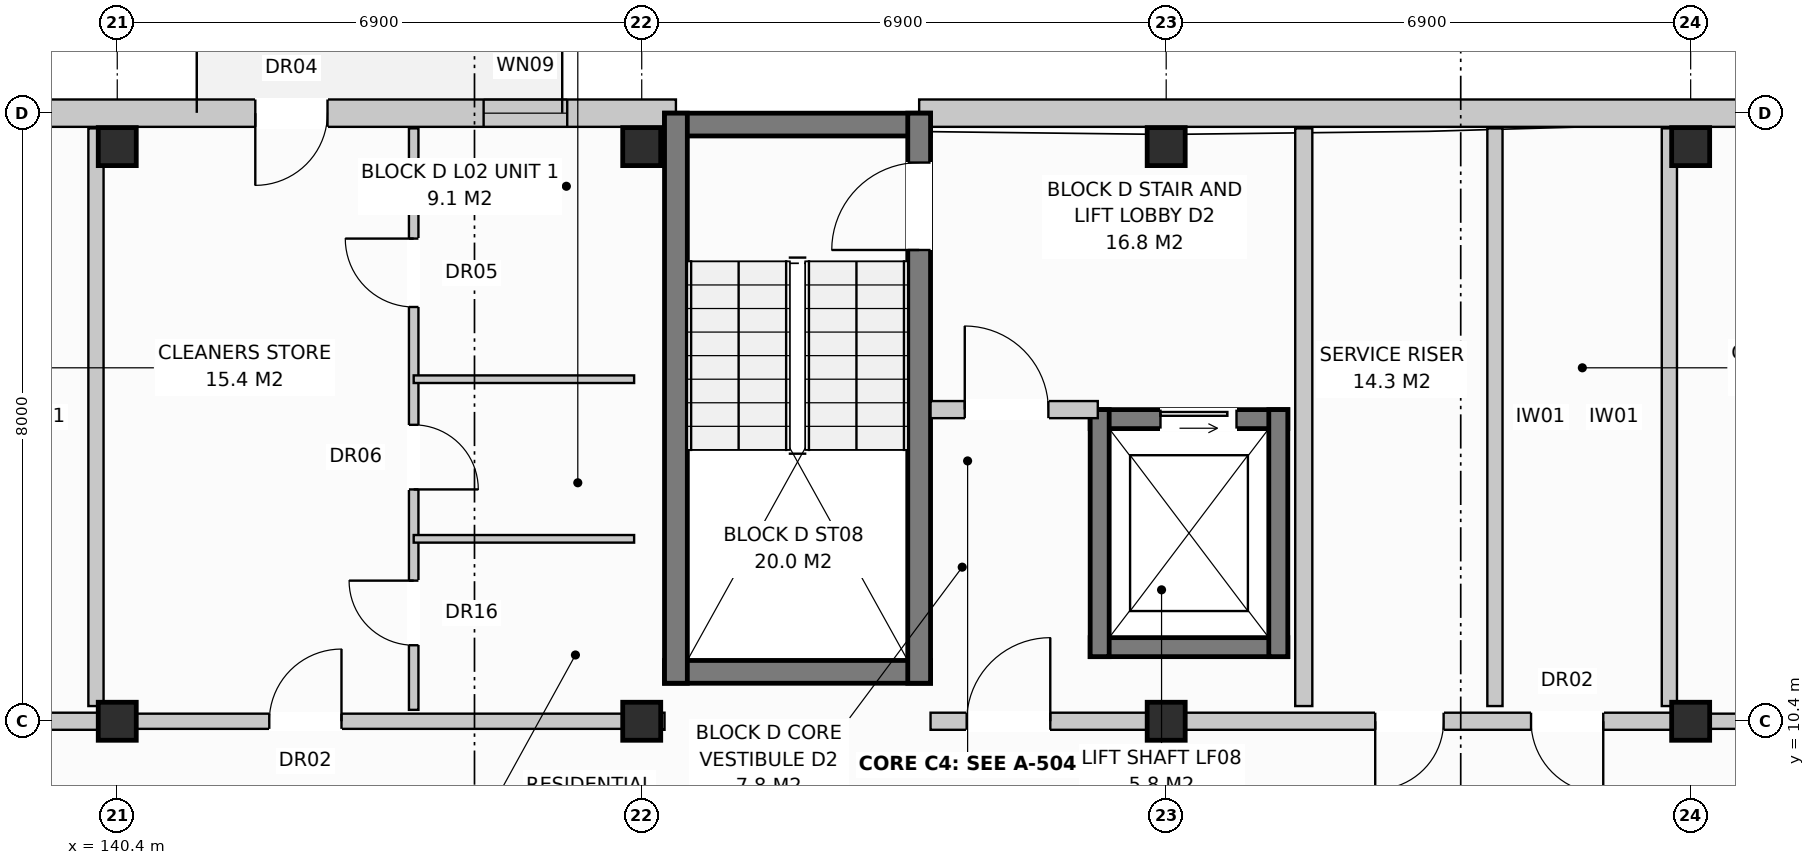
"""IFC4 building model, lengths in metres.
Left out: names, types, materials, properties, quantities, classifications, styles, units other than length and angle.
Written with IfcOpenShell. Run it as: python <this file> out.ifc"""

import sys

from ifc_helpers import new_model, si_unit, direction, frame, frame_2d, origin, origin_with_axes, origin_2d, place, context, subcontext, project, spatial, rectangle, extrude, element, fill, save


model = new_model("IFC4")
c1 = context("Model", 3, precision=1e-05, world=origin(), true_north=direction((0.0, 1.0)))
c2 = subcontext(c1, "Body", "Model", "MODEL_VIEW")
j1 = project(units=[si_unit("LENGTHUNIT", "METRE"), si_unit("PLANEANGLEUNIT", "RADIAN")], contexts=[c1])
p1 = place(None, origin())
s1 = spatial("IfcSite", under=j1, at=p1, CompositionType="ELEMENT")
p2 = place(p1, origin())
s2 = spatial("IfcBuilding", under=s1, at=p2, CompositionType="ELEMENT")
p3 = place(p2, frame((0.0, 0.0, 8.0)))
s3 = spatial("IfcBuildingStorey", under=s2, at=p3, CompositionType="ELEMENT", Elevation=8.0)
for number, where, z_axis, x_axis in (
    (1, (140.4, 10.4, 0.0), (0.0, 0.0, 1.0), (1.0, 0.0, 0.0)),
    (2, (140.4, 17.96, 0.0), (0.0, 0.0, 1.0), (1.0, 0.0, 0.0)),
    (3, (147.3, 10.4, 0.0), (0.0, 0.0, 1.0), (1.0, 0.0, 0.0)),
    (4, (147.3, 17.96, 0.0), (0.0, 0.0, 1.0), (1.0, 0.0, 0.0)),
    (5, (154.2, 10.4, 0.0), (0.0, 0.0, 1.0), (1.0, 0.0, 0.0)),
    (6, (154.2, 17.96, 0.0), (0.0, 0.0, 1.0), (1.0, 0.0, 0.0)),
    (7, (161.1, 10.4, 0.0), (0.0, 0.0, 1.0), (1.0, 0.0, 0.0)),
    (8, (161.1, 17.96, 0.0), (0.0, 0.0, 1.0), (1.0, 0.0, 0.0)),
):
    element("IfcColumn", number, at=place(p3, frame(where, z_axis=z_axis, x_axis=x_axis)), inside=s3, PredefinedType="COLUMN", context=c2, shape_type="SweptSolid", body=[
        extrude(rectangle(XDim=0.5, YDim=0.5, at=origin_2d()), origin(), (0.0, 0.0, 1.0), 3.2),
    ])
p4 = place(p3, frame((130.25, 18.4, 0.0), z_axis=(0.0, 0.0, 1.0), x_axis=(1.0, 0.0, 0.0)))
e9 = element("IfcWall", 9, at=p4, inside=s3, PredefinedType="STANDARD", context=c2, shape_type="SweptSolid", body=[
    extrude(rectangle(XDim=17.5, YDim=0.36, at=frame_2d((8.75, 0.0))), origin(), (0.0, 0.0, 1.0), 2.94),
])
p5 = place(p4, frame((11.966, 0.0, 0.0)))
e10 = element("IfcOpeningElement", 10, at=p5, cuts=e9, PredefinedType="OPENING", context=c2, shape_type="SweptSolid", body=[
    extrude(rectangle(XDim=0.95, YDim=2.1, at=frame_2d((0.475, 1.05))), frame((0.0, 0.192, 0.0), z_axis=(0.0, -1.0, 0.0), x_axis=(1.0, 0.0, 0.0)), (0.0, 0.0, 1.0), 0.384),
])
p6 = place(p4, frame((14.97, 0.0, 0.72)))
e11 = element("IfcOpeningElement", 11, at=p6, cuts=e9, PredefinedType="OPENING", context=c2, shape_type="SweptSolid", body=[
    extrude(rectangle(XDim=1.1, YDim=1.5, at=frame_2d((0.55, 0.75))), frame((0.0, 0.192, 0.0), z_axis=(0.0, -1.0, 0.0), x_axis=(1.0, 0.0, 0.0)), (0.0, 0.0, 1.0), 0.384),
])
p7 = place(p3, frame((150.95, 18.4, 0.0), z_axis=(0.0, 0.0, 1.0), x_axis=(1.0, 0.0, 0.0)))
e12 = element("IfcWall", 12, at=p7, inside=s3, PredefinedType="STANDARD", context=c2, shape_type="SweptSolid", body=[
    extrude(rectangle(XDim=16.88, YDim=0.36, at=frame_2d((8.44, 0.0))), origin(), (0.0, 0.0, 1.0), 2.94),
])
p8 = place(p7, frame((11.17, 0.0, 0.8)))
e13 = element("IfcOpeningElement", 13, at=p8, cuts=e12, PredefinedType="OPENING", context=c2, shape_type="SweptSolid", body=[
    extrude(rectangle(XDim=1.9, YDim=1.85, at=frame_2d((0.95, 0.925))), frame((0.0, 0.192, 0.0), z_axis=(0.0, -1.0, 0.0), x_axis=(1.0, 0.0, 0.0)), (0.0, 0.0, 1.0), 0.384),
])
p9 = place(p7, frame((14.97, 0.0, 0.72)))
e14 = element("IfcOpeningElement", 14, at=p9, cuts=e12, PredefinedType="OPENING", context=c2, shape_type="SweptSolid", body=[
    extrude(rectangle(XDim=1.1, YDim=1.5, at=frame_2d((0.55, 0.75))), frame((0.0, 0.192, 0.0), z_axis=(0.0, -1.0, 0.0), x_axis=(1.0, 0.0, 0.0)), (0.0, 0.0, 1.0), 0.384),
])
p10 = place(p3, frame((140.12, 10.6, 0.0), z_axis=(0.0, 0.0, 1.0), x_axis=(0.0, 1.0, 0.0)))
e15 = element("IfcWall", 15, at=p10, inside=s3, PredefinedType="PARTITIONING", context=c2, shape_type="SweptSolid", body=[
    extrude(rectangle(XDim=7.6, YDim=0.2, at=frame_2d((3.8, 0.0))), origin(), (0.0, 0.0, 1.0), 2.94),
])
p11 = place(p3, frame((130.4, 10.4, 0.0), z_axis=(0.0, 0.0, 1.0), x_axis=(1.0, 0.0, 0.0)))
e16 = element("IfcWall", 16, at=p11, inside=s3, PredefinedType="PARTITIONING", context=c2, shape_type="SweptSolid", body=[
    extrude(rectangle(XDim=10.0, YDim=0.225, at=frame_2d((5.0, 0.0))), origin(), (0.0, 0.0, 1.0), 2.38),
])
p12 = place(p11, frame((0.475, 0.0, 0.0)))
e17 = element("IfcOpeningElement", 17, at=p12, cuts=e16, PredefinedType="OPENING", context=c2, shape_type="SweptSolid", body=[
    extrude(rectangle(XDim=1.1, YDim=2.15, at=frame_2d((0.55, 1.075))), frame((0.0, 0.125, 0.0), z_axis=(0.0, -1.0, 0.0), x_axis=(1.0, 0.0, 0.0)), (0.0, 0.0, 1.0), 0.249),
])
p13 = place(p11, frame((5.85, 0.0, 0.0)))
e18 = element("IfcOpeningElement", 18, at=p13, cuts=e16, PredefinedType="OPENING", context=c2, shape_type="SweptSolid", body=[
    extrude(rectangle(XDim=0.9, YDim=2.1, at=frame_2d((0.45, 1.05))), frame((0.0, 0.125, 0.0), z_axis=(0.0, -1.0, 0.0), x_axis=(1.0, 0.0, 0.0)), (0.0, 0.0, 1.0), 0.249),
])
p14 = place(p11, frame((7.9, 0.0, 0.0)))
e19 = element("IfcOpeningElement", 19, at=p14, cuts=e16, PredefinedType="OPENING", context=c2, shape_type="SweptSolid", body=[
    extrude(rectangle(XDim=0.95, YDim=2.15, at=frame_2d((0.475, 1.075))), frame((0.0, 0.125, 0.0), z_axis=(0.0, -1.0, 0.0), x_axis=(1.0, 0.0, 0.0)), (0.0, 0.0, 1.0), 0.249),
])
for number, where, z_axis, x_axis in (
    (20, (147.6, 18.25, 0.0), (0.0, 0.0, 1.0), (1.0, 0.0, 0.0)),
    (21, (147.6, 11.05, 0.0), (0.0, 0.0, 1.0), (1.0, 0.0, 0.0)),
):
    element("IfcWall", number, at=place(p3, frame(where, z_axis=z_axis, x_axis=x_axis)), inside=s3, PredefinedType="SHEAR", context=c2, shape_type="SweptSolid", body=[
        extrude(rectangle(XDim=3.5, YDim=0.3, at=frame_2d((1.75, 0.0))), origin(), (0.0, 0.0, 1.0), 2.94),
    ])
p15 = place(p3, frame((147.75, 10.9, 0.0), z_axis=(0.0, 0.0, 1.0), x_axis=(0.0, 1.0, 0.0)))
e22 = element("IfcWall", 22, at=p15, inside=s3, PredefinedType="SHEAR", context=c2, shape_type="SweptSolid", body=[
    extrude(rectangle(XDim=7.5, YDim=0.3, at=frame_2d((3.75, 0.0))), origin(), (0.0, 0.0, 1.0), 2.94),
])
p16 = place(p3, frame((150.95, 10.9, 0.0), z_axis=(0.0, 0.0, 1.0), x_axis=(0.0, 1.0, 0.0)))
e23 = element("IfcWall", 23, at=p16, inside=s3, PredefinedType="SHEAR", context=c2, shape_type="SweptSolid", body=[
    extrude(rectangle(XDim=7.5, YDim=0.3, at=frame_2d((3.75, 0.0))), origin(), (0.0, 0.0, 1.0), 2.94),
])
p17 = place(p16, frame((5.7, 0.0, 0.0)))
e24 = element("IfcOpeningElement", 24, at=p17, cuts=e23, PredefinedType="OPENING", context=c2, shape_type="SweptSolid", body=[
    extrude(rectangle(XDim=1.15, YDim=2.15, at=frame_2d((0.575, 1.075))), frame((0.0, 0.162, 0.0), z_axis=(0.0, -1.0, 0.0), x_axis=(1.0, 0.0, 0.0)), (0.0, 0.0, 1.0), 0.324),
])
p18 = place(p3, frame((153.2, 14.375, 0.0), z_axis=(0.0, 0.0, 1.0), x_axis=(1.0, 0.0, 0.0)))
e25 = element("IfcWall", 25, at=p18, inside=s3, PredefinedType="SHEAR", context=c2, shape_type="SweptSolid", body=[
    extrude(rectangle(XDim=2.6, YDim=0.25, at=frame_2d((1.3, 0.0))), origin(), (0.0, 0.0, 1.0), 2.94),
])
p19 = place(p18, frame((0.925, 0.0, 0.0)))
e26 = element("IfcOpeningElement", 26, at=p19, cuts=e25, PredefinedType="OPENING", context=c2, shape_type="SweptSolid", body=[
    extrude(rectangle(XDim=1.0, YDim=2.1, at=frame_2d((0.5, 1.05))), frame((0.0, 0.137, 0.0), z_axis=(0.0, -1.0, 0.0), x_axis=(1.0, 0.0, 0.0)), (0.0, 0.0, 1.0), 0.274),
])
p20 = place(p3, frame((153.2, 11.375, 0.0), z_axis=(0.0, 0.0, 1.0), x_axis=(1.0, 0.0, 0.0)))
e27 = element("IfcWall", 27, at=p20, inside=s3, PredefinedType="SHEAR", context=c2, shape_type="SweptSolid", body=[
    extrude(rectangle(XDim=2.6, YDim=0.25, at=frame_2d((1.3, 0.0))), origin(), (0.0, 0.0, 1.0), 2.94),
])
for number, where, z_axis, x_axis in (
    (28, (153.325, 11.25, 0.0), (0.0, 0.0, 1.0), (0.0, 1.0, 0.0)),
    (29, (155.675, 11.25, 0.0), (0.0, 0.0, 1.0), (0.0, 1.0, 0.0)),
):
    element("IfcWall", number, at=place(p3, frame(where, z_axis=z_axis, x_axis=x_axis)), inside=s3, PredefinedType="SHEAR", context=c2, shape_type="SweptSolid", body=[
        extrude(rectangle(XDim=3.25, YDim=0.25, at=frame_2d((1.625, 0.0))), origin(), (0.0, 0.0, 1.0), 2.94),
    ])
p21 = place(p3, frame((156.01, 10.6, 0.0), z_axis=(0.0, 0.0, 1.0), x_axis=(0.0, 1.0, 0.0)))
e30 = element("IfcWall", 30, at=p21, inside=s3, PredefinedType="PARTITIONING", context=c2, shape_type="SweptSolid", body=[
    extrude(rectangle(XDim=7.6, YDim=0.225, at=frame_2d((3.8, 0.0))), origin(), (0.0, 0.0, 1.0), 2.59),
])
p22 = place(p3, frame((151.1, 14.5, 0.0), z_axis=(0.0, 0.0, 1.0), x_axis=(1.0, 0.0, 0.0)))
e31 = element("IfcWall", 31, at=p22, inside=s3, PredefinedType="PARTITIONING", context=c2, shape_type="SweptSolid", body=[
    extrude(rectangle(XDim=2.2, YDim=0.225, at=frame_2d((1.1, 0.0))), origin(), (0.0, 0.0, 1.0), 2.94),
])
p23 = place(p22, frame((0.45, 0.0, 0.0)))
e32 = element("IfcOpeningElement", 32, at=p23, cuts=e31, PredefinedType="OPENING", context=c2, shape_type="SweptSolid", body=[
    extrude(rectangle(XDim=1.1, YDim=2.15, at=frame_2d((0.55, 1.075))), frame((0.0, 0.125, 0.0), z_axis=(0.0, -1.0, 0.0), x_axis=(1.0, 0.0, 0.0)), (0.0, 0.0, 1.0), 0.249),
])
p24 = place(p3, frame((147.3, 10.4, 0.0), z_axis=(0.0, 0.0, 1.0), x_axis=(1.0, 0.0, 0.0)))
e33 = element("IfcWall", 33, at=p24, inside=s3, PredefinedType="PARTITIONING", context=c2, shape_type="SweptSolid", body=[
    extrude(rectangle(XDim=0.3, YDim=0.225, at=frame_2d((0.15, 0.0))), origin(), (0.0, 0.0, 1.0), 2.94),
])
p25 = place(p3, frame((158.525, 10.6, 0.0), z_axis=(0.0, 0.0, 1.0), x_axis=(0.0, 1.0, 0.0)))
e34 = element("IfcWall", 34, at=p25, inside=s3, PredefinedType="PARTITIONING", context=c2, shape_type="SweptSolid", body=[
    extrude(rectangle(XDim=7.6, YDim=0.2, at=frame_2d((3.8, 0.0))), origin(), (0.0, 0.0, 1.0), 2.94),
])
p26 = place(p3, frame((160.82, 10.6, 0.0), z_axis=(0.0, 0.0, 1.0), x_axis=(0.0, 1.0, 0.0)))
e35 = element("IfcWall", 35, at=p26, inside=s3, PredefinedType="PARTITIONING", context=c2, shape_type="SweptSolid", body=[
    extrude(rectangle(XDim=7.6, YDim=0.2, at=frame_2d((3.8, 0.0))), origin(), (0.0, 0.0, 1.0), 2.38),
])
p27 = place(p3, frame((151.1, 10.4, 0.0), z_axis=(0.0, 0.0, 1.0), x_axis=(1.0, 0.0, 0.0)))
e36 = element("IfcWall", 36, at=p27, inside=s3, PredefinedType="PARTITIONING", context=c2, shape_type="SweptSolid", body=[
    extrude(rectangle(XDim=10.0, YDim=0.225, at=frame_2d((5.0, 0.0))), origin(), (0.0, 0.0, 1.0), 2.38),
])
p28 = place(p27, frame((0.475, 0.0, 0.0)))
e37 = element("IfcOpeningElement", 37, at=p28, cuts=e36, PredefinedType="OPENING", context=c2, shape_type="SweptSolid", body=[
    extrude(rectangle(XDim=1.1, YDim=2.15, at=frame_2d((0.55, 1.075))), frame((0.0, 0.125, 0.0), z_axis=(0.0, -1.0, 0.0), x_axis=(1.0, 0.0, 0.0)), (0.0, 0.0, 1.0), 0.249),
])
p29 = place(p27, frame((5.85, 0.0, 0.0)))
e38 = element("IfcOpeningElement", 38, at=p29, cuts=e36, PredefinedType="OPENING", context=c2, shape_type="SweptSolid", body=[
    extrude(rectangle(XDim=0.9, YDim=2.1, at=frame_2d((0.45, 1.05))), frame((0.0, 0.125, 0.0), z_axis=(0.0, -1.0, 0.0), x_axis=(1.0, 0.0, 0.0)), (0.0, 0.0, 1.0), 0.249),
])
p30 = place(p27, frame((7.9, 0.0, 0.0)))
e39 = element("IfcOpeningElement", 39, at=p30, cuts=e36, PredefinedType="OPENING", context=c2, shape_type="SweptSolid", body=[
    extrude(rectangle(XDim=0.95, YDim=2.15, at=frame_2d((0.475, 1.075))), frame((0.0, 0.125, 0.0), z_axis=(0.0, -1.0, 0.0), x_axis=(1.0, 0.0, 0.0)), (0.0, 0.0, 1.0), 0.249),
])
p31 = place(p3, frame((140.4, 10.4, 0.0), z_axis=(0.0, 0.0, 1.0), x_axis=(1.0, 0.0, 0.0)))
e40 = element("IfcWall", 40, at=p31, inside=s3, PredefinedType="PARTITIONING", context=c2, shape_type="SweptSolid", body=[
    extrude(rectangle(XDim=6.9, YDim=0.2, at=frame_2d((3.45, 0.0))), origin(), (0.0, 0.0, 1.0), 2.38),
])
p32 = place(p31, frame((2.0, 0.0, 0.0)))
e41 = element("IfcOpeningElement", 41, at=p32, cuts=e40, PredefinedType="OPENING", context=c2, shape_type="SweptSolid", body=[
    extrude(rectangle(XDim=0.95, YDim=2.15, at=frame_2d((0.475, 1.075))), frame((0.0, 0.112, 0.0), z_axis=(0.0, -1.0, 0.0), x_axis=(1.0, 0.0, 0.0)), (0.0, 0.0, 1.0), 0.224),
])
p33 = place(p3, frame((144.3, 10.55, 0.0), z_axis=(0.0, 0.0, 1.0), x_axis=(0.0, 1.0, 0.0)))
e42 = element("IfcWall", 42, at=p33, inside=s3, PredefinedType="PARTITIONING", context=c2, shape_type="SweptSolid", body=[
    extrude(rectangle(XDim=7.65, YDim=0.125, at=frame_2d((3.825, 0.0))), origin(), (0.0, 0.0, 1.0), 2.94),
])
p34 = place(p33, frame((0.85, 0.0, 0.0)))
e43 = element("IfcOpeningElement", 43, at=p34, cuts=e42, PredefinedType="OPENING", context=c2, shape_type="SweptSolid", body=[
    extrude(rectangle(XDim=0.85, YDim=2.1, at=frame_2d((0.425, 1.05))), frame((0.0, 0.074, 0.0), z_axis=(0.0, -1.0, 0.0), x_axis=(1.0, 0.0, 0.0)), (0.0, 0.0, 1.0), 0.149),
])
p35 = place(p33, frame((2.9, 0.0, 0.0)))
e44 = element("IfcOpeningElement", 44, at=p35, cuts=e42, PredefinedType="OPENING", context=c2, shape_type="SweptSolid", body=[
    extrude(rectangle(XDim=0.85, YDim=2.05, at=frame_2d((0.425, 1.025))), frame((0.0, 0.074, 0.0), z_axis=(0.0, -1.0, 0.0), x_axis=(1.0, 0.0, 0.0)), (0.0, 0.0, 1.0), 0.149),
])
p36 = place(p33, frame((5.3, 0.0, 0.0)))
e45 = element("IfcOpeningElement", 45, at=p36, cuts=e42, PredefinedType="OPENING", context=c2, shape_type="SweptSolid", body=[
    extrude(rectangle(XDim=0.9, YDim=2.1, at=frame_2d((0.45, 1.05))), frame((0.0, 0.074, 0.0), z_axis=(0.0, -1.0, 0.0), x_axis=(1.0, 0.0, 0.0)), (0.0, 0.0, 1.0), 0.149),
])
for number, where, z_axis, x_axis in (
    (46, (144.3, 12.8, 0.0), (0.0, 0.0, 1.0), (1.0, 0.0, 0.0)),
    (47, (144.3, 14.9, 0.0), (0.0, 0.0, 1.0), (1.0, 0.0, 0.0)),
):
    element("IfcWall", number, at=place(p3, frame(where, z_axis=z_axis, x_axis=x_axis)), inside=s3, PredefinedType="PARTITIONING", context=c2, shape_type="SweptSolid", body=[
        extrude(rectangle(XDim=2.9, YDim=0.1, at=frame_2d((1.45, 0.0))), origin(), (0.0, 0.0, 1.0), 2.94),
    ])
p37 = place(p3, frame((161.1, 10.4, 0.0), z_axis=(0.0, 0.0, 1.0), x_axis=(1.0, 0.0, 0.0)))
e48 = element("IfcWall", 48, at=p37, inside=s3, PredefinedType="PARTITIONING", context=c2, shape_type="SweptSolid", body=[
    extrude(rectangle(XDim=6.9, YDim=0.2, at=frame_2d((3.45, 0.0))), origin(), (0.0, 0.0, 1.0), 2.38),
])
p38 = place(p37, frame((2.0, 0.0, 0.0)))
e49 = element("IfcOpeningElement", 49, at=p38, cuts=e48, PredefinedType="OPENING", context=c2, shape_type="SweptSolid", body=[
    extrude(rectangle(XDim=0.95, YDim=2.15, at=frame_2d((0.475, 1.075))), frame((0.0, 0.112, 0.0), z_axis=(0.0, -1.0, 0.0), x_axis=(1.0, 0.0, 0.0)), (0.0, 0.0, 1.0), 0.224),
])
p39 = place(p5, frame((0.95, 0.0, 0.0), z_axis=(0.0, 0.0, 1.0), x_axis=(-1.0, 0.0, 0.0)))
e50 = element("IfcDoor", 50, at=p39, inside=s3, OperationType="SINGLE_SWING_LEFT", PredefinedType="DOOR", context=c2, shape_type="SweptSolid", body=[
    extrude(rectangle(XDim=0.95, YDim=2.1, at=frame_2d((0.475, 1.05))), frame((0.0, 0.025, 0.0), z_axis=(0.0, -1.0, 0.0), x_axis=(1.0, 0.0, 0.0)), (0.0, 0.0, 1.0), 0.05),
])
fill(e10, e50)
p40 = place(p6, origin_with_axes())
e51 = element("IfcWindow", 51, at=p40, inside=s3, PartitioningType="SINGLE_PANEL", PredefinedType="WINDOW", context=c2, shape_type="SweptSolid", body=[
    extrude(rectangle(XDim=1.1, YDim=1.5, at=frame_2d((0.55, 0.75))), frame((0.0, 0.03, 0.0), z_axis=(0.0, -1.0, 0.0), x_axis=(1.0, 0.0, 0.0)), (0.0, 0.0, 1.0), 0.06),
])
fill(e11, e51)
p41 = place(p17, origin_with_axes())
e52 = element("IfcDoor", 52, at=p41, inside=s3, OperationType="SINGLE_SWING_LEFT", PredefinedType="DOOR", context=c2, shape_type="SweptSolid", body=[
    extrude(rectangle(XDim=1.15, YDim=2.15, at=frame_2d((0.575, 1.075))), frame((0.0, 0.025, 0.0), z_axis=(0.0, -1.0, 0.0), x_axis=(1.0, 0.0, 0.0)), (0.0, 0.0, 1.0), 0.05),
])
fill(e24, e52)
p42 = place(p19, origin_with_axes())
e53 = element("IfcDoor", 53, at=p42, inside=s3, OperationType="SLIDING_TO_LEFT", PredefinedType="DOOR", context=c2, shape_type="SweptSolid", body=[
    extrude(rectangle(XDim=1.0, YDim=2.1, at=frame_2d((0.5, 1.05))), frame((0.0, 0.025, 0.0), z_axis=(0.0, -1.0, 0.0), x_axis=(1.0, 0.0, 0.0)), (0.0, 0.0, 1.0), 0.05),
])
fill(e26, e53)
p43 = place(p23, origin_with_axes())
e54 = element("IfcDoor", 54, at=p43, inside=s3, OperationType="SINGLE_SWING_LEFT", PredefinedType="DOOR", context=c2, shape_type="SweptSolid", body=[
    extrude(rectangle(XDim=1.1, YDim=2.15, at=frame_2d((0.55, 1.075))), frame((0.0, 0.025, 0.0), z_axis=(0.0, -1.0, 0.0), x_axis=(1.0, 0.0, 0.0)), (0.0, 0.0, 1.0), 0.05),
])
fill(e32, e54)
p44 = place(p28, origin_with_axes())
e55 = element("IfcDoor", 55, at=p44, inside=s3, OperationType="SINGLE_SWING_RIGHT", PredefinedType="DOOR", context=c2, shape_type="SweptSolid", body=[
    extrude(rectangle(XDim=1.1, YDim=2.15, at=frame_2d((0.55, 1.075))), frame((0.0, 0.025, 0.0), z_axis=(0.0, -1.0, 0.0), x_axis=(1.0, 0.0, 0.0)), (0.0, 0.0, 1.0), 0.05),
])
fill(e37, e55)
p45 = place(p29, frame((0.9, 0.0, 0.0), z_axis=(0.0, 0.0, 1.0), x_axis=(-1.0, 0.0, 0.0)))
e56 = element("IfcDoor", 56, at=p45, inside=s3, OperationType="SINGLE_SWING_LEFT", PredefinedType="DOOR", context=c2, shape_type="SweptSolid", body=[
    extrude(rectangle(XDim=0.9, YDim=2.1, at=frame_2d((0.45, 1.05))), frame((0.0, 0.025, 0.0), z_axis=(0.0, -1.0, 0.0), x_axis=(1.0, 0.0, 0.0)), (0.0, 0.0, 1.0), 0.05),
])
fill(e38, e56)
p46 = place(p30, frame((0.95, 0.0, 0.0), z_axis=(0.0, 0.0, 1.0), x_axis=(-1.0, 0.0, 0.0)))
e57 = element("IfcDoor", 57, at=p46, inside=s3, OperationType="SINGLE_SWING_RIGHT", PredefinedType="DOOR", context=c2, shape_type="SweptSolid", body=[
    extrude(rectangle(XDim=0.95, YDim=2.15, at=frame_2d((0.475, 1.075))), frame((0.0, 0.025, 0.0), z_axis=(0.0, -1.0, 0.0), x_axis=(1.0, 0.0, 0.0)), (0.0, 0.0, 1.0), 0.05),
])
fill(e39, e57)
p47 = place(p32, origin_with_axes())
e58 = element("IfcDoor", 58, at=p47, inside=s3, OperationType="SINGLE_SWING_RIGHT", PredefinedType="DOOR", context=c2, shape_type="SweptSolid", body=[
    extrude(rectangle(XDim=0.95, YDim=2.15, at=frame_2d((0.475, 1.075))), frame((0.0, 0.025, 0.0), z_axis=(0.0, -1.0, 0.0), x_axis=(1.0, 0.0, 0.0)), (0.0, 0.0, 1.0), 0.05),
])
fill(e41, e58)
p48 = place(p34, origin_with_axes())
e59 = element("IfcDoor", 59, at=p48, inside=s3, OperationType="SINGLE_SWING_RIGHT", PredefinedType="DOOR", context=c2, shape_type="SweptSolid", body=[
    extrude(rectangle(XDim=0.85, YDim=2.1, at=frame_2d((0.425, 1.05))), frame((0.0, 0.025, 0.0), z_axis=(0.0, -1.0, 0.0), x_axis=(1.0, 0.0, 0.0)), (0.0, 0.0, 1.0), 0.05),
])
fill(e43, e59)
p49 = place(p35, frame((0.85, 0.0, 0.0), z_axis=(0.0, 0.0, 1.0), x_axis=(-1.0, 0.0, 0.0)))
e60 = element("IfcDoor", 60, at=p49, inside=s3, OperationType="SINGLE_SWING_LEFT", PredefinedType="DOOR", context=c2, shape_type="SweptSolid", body=[
    extrude(rectangle(XDim=0.85, YDim=2.05, at=frame_2d((0.425, 1.025))), frame((0.0, 0.025, 0.0), z_axis=(0.0, -1.0, 0.0), x_axis=(1.0, 0.0, 0.0)), (0.0, 0.0, 1.0), 0.05),
])
fill(e44, e60)
p50 = place(p36, origin_with_axes())
e61 = element("IfcDoor", 61, at=p50, inside=s3, OperationType="SINGLE_SWING_RIGHT", PredefinedType="DOOR", context=c2, shape_type="SweptSolid", body=[
    extrude(rectangle(XDim=0.9, YDim=2.1, at=frame_2d((0.45, 1.05))), frame((0.0, 0.025, 0.0), z_axis=(0.0, -1.0, 0.0), x_axis=(1.0, 0.0, 0.0)), (0.0, 0.0, 1.0), 0.05),
])
fill(e45, e61)
save(model, sys.argv[1])
